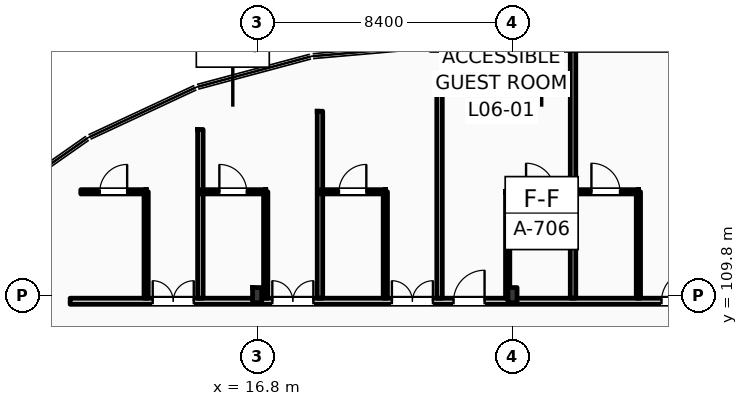
"""IFC4 building model, lengths in metres.
Left out: names, types, materials, properties, quantities, classifications, styles, units other than length and angle.
Written with IfcOpenShell. Run it as: python <this file> out.ifc"""

import sys

from ifc_helpers import new_model, si_unit, direction, frame, frame_2d, origin, origin_2d, place, context, subcontext, project, spatial, rectangle, i_section, extrude, element, fill, save


model = new_model("IFC4")
c1 = context("Model", 3, precision=1e-05, world=origin(), true_north=direction((0.0, 1.0)))
c2 = subcontext(c1, "Body", "Model", "MODEL_VIEW")
j1 = project(units=[si_unit("LENGTHUNIT", "METRE"), si_unit("PLANEANGLEUNIT", "RADIAN")], contexts=[c1])
p1 = place(None, origin())
s1 = spatial("IfcSite", under=j1, at=p1, CompositionType="ELEMENT")
p2 = place(p1, origin())
s2 = spatial("IfcBuilding", under=s1, at=p2, CompositionType="ELEMENT")
p3 = place(p2, frame((0.0, 0.0, 28.2)))
s3 = spatial("IfcBuildingStorey", under=s2, at=p3, CompositionType="ELEMENT", Elevation=28.2)
for number, where, z_axis, x_axis in (
    (1, (16.8, 109.8, 0.0), (0.0, 0.0, 1.0), (1.0, 0.0, 0.0)),
    (2, (25.2, 109.8, 0.0), (0.0, 0.0, 1.0), (1.0, 0.0, 0.0)),
):
    element("IfcColumn", number, at=place(p3, frame(where, z_axis=z_axis, x_axis=x_axis)), inside=s3, PredefinedType="COLUMN", context=c2, shape_type="SweptSolid", body=[
        extrude(i_section(OverallWidth=0.3, OverallDepth=0.5, WebThickness=0.014, FlangeThickness=0.028, FilletRadius=0.027, at=origin_2d()), origin(), (0.0, 0.0, 1.0), 3.6),
    ])
p4 = place(p3, frame((25.2, 118.0, 0.0), z_axis=(0.0, 0.0, 1.0), x_axis=(1.0, 0.0, 0.0)))
e3 = element("IfcColumn", 3, at=p4, inside=s3, PredefinedType="COLUMN", context=c2, shape_type="SweptSolid", body=[
    extrude(i_section(OverallWidth=0.3, OverallDepth=0.45, WebThickness=0.014, FlangeThickness=0.026, FilletRadius=0.027, at=origin_2d()), origin(), (0.0, 0.0, 1.0), 3.6),
])
p5 = place(p3, frame((10.65, 109.6, 0.0), z_axis=(0.0, 0.0, 1.0), x_axis=(1.0, 0.0, 0.0)))
e4 = element("IfcWall", 4, at=p5, inside=s3, PredefinedType="PARTITIONING", context=c2, shape_type="SweptSolid", body=[
    extrude(rectangle(XDim=109.21, YDim=0.2, at=frame_2d((54.605, 0.0))), origin(), (0.0, 0.0, 1.0), 2.8),
])
p6 = place(p5, frame((12.611, 0.0, 0.0)))
e5 = element("IfcOpeningElement", 5, at=p6, cuts=e4, PredefinedType="OPENING", context=c2, shape_type="SweptSolid", body=[
    extrude(rectangle(XDim=1.02, YDim=2.2, at=frame_2d((0.51, 1.1))), frame((0.0, 0.11, 0.0), z_axis=(0.0, -1.0, 0.0), x_axis=(1.0, 0.0, 0.0)), (0.0, 0.0, 1.0), 0.22),
])
p7 = place(p5, frame((19.451, 0.0, 0.0)))
e6 = element("IfcOpeningElement", 6, at=p7, cuts=e4, PredefinedType="OPENING", context=c2, shape_type="SweptSolid", body=[
    extrude(rectangle(XDim=1.02, YDim=2.2, at=frame_2d((0.51, 1.1))), frame((0.0, 0.11, 0.0), z_axis=(0.0, -1.0, 0.0), x_axis=(1.0, 0.0, 0.0)), (0.0, 0.0, 1.0), 0.22),
])
p8 = place(p5, frame((23.842, 0.0, 0.0)))
e7 = element("IfcOpeningElement", 7, at=p8, cuts=e4, PredefinedType="OPENING", context=c2, shape_type="SweptSolid", body=[
    extrude(rectangle(XDim=1.02, YDim=2.2, at=frame_2d((0.51, 1.1))), frame((0.0, 0.11, 0.0), z_axis=(0.0, -1.0, 0.0), x_axis=(1.0, 0.0, 0.0)), (0.0, 0.0, 1.0), 0.22),
])
p9 = place(p5, frame((26.084, 0.0, 0.0)))
e8 = element("IfcOpeningElement", 8, at=p9, cuts=e4, PredefinedType="OPENING", context=c2, shape_type="SweptSolid", body=[
    extrude(rectangle(XDim=1.02, YDim=2.2, at=frame_2d((0.51, 1.1))), frame((0.0, 0.11, 0.0), z_axis=(0.0, -1.0, 0.0), x_axis=(1.0, 0.0, 0.0)), (0.0, 0.0, 1.0), 0.22),
])
p10 = place(p5, frame((32.655, 0.0, 0.0)))
e9 = element("IfcOpeningElement", 9, at=p10, cuts=e4, PredefinedType="OPENING", context=c2, shape_type="SweptSolid", body=[
    extrude(rectangle(XDim=0.96, YDim=2.2, at=frame_2d((0.48, 1.1))), frame((0.0, 0.11, 0.0), z_axis=(0.0, -1.0, 0.0), x_axis=(1.0, 0.0, 0.0)), (0.0, 0.0, 1.0), 0.22),
])
p11 = place(p5, frame((34.895, 0.0, 0.0)))
e10 = element("IfcOpeningElement", 10, at=p11, cuts=e4, PredefinedType="OPENING", context=c2, shape_type="SweptSolid", body=[
    extrude(rectangle(XDim=0.96, YDim=2.2, at=frame_2d((0.48, 1.1))), frame((0.0, 0.11, 0.0), z_axis=(0.0, -1.0, 0.0), x_axis=(1.0, 0.0, 0.0)), (0.0, 0.0, 1.0), 0.22),
])
p12 = place(p5, frame((41.436, 0.0, 0.0)))
e11 = element("IfcOpeningElement", 11, at=p12, cuts=e4, PredefinedType="OPENING", context=c2, shape_type="SweptSolid", body=[
    extrude(rectangle(XDim=0.96, YDim=2.2, at=frame_2d((0.48, 1.1))), frame((0.0, 0.11, 0.0), z_axis=(0.0, -1.0, 0.0), x_axis=(1.0, 0.0, 0.0)), (0.0, 0.0, 1.0), 0.22),
])
p13 = place(p5, frame((43.427, 0.0, 0.0)))
e12 = element("IfcOpeningElement", 12, at=p13, cuts=e4, PredefinedType="OPENING", context=c2, shape_type="SweptSolid", body=[
    extrude(rectangle(XDim=0.96, YDim=2.2, at=frame_2d((0.48, 1.1))), frame((0.0, 0.11, 0.0), z_axis=(0.0, -1.0, 0.0), x_axis=(1.0, 0.0, 0.0)), (0.0, 0.0, 1.0), 0.22),
])
p14 = place(p5, frame((50.218, 0.0, 0.0)))
e13 = element("IfcOpeningElement", 13, at=p14, cuts=e4, PredefinedType="OPENING", context=c2, shape_type="SweptSolid", body=[
    extrude(rectangle(XDim=0.96, YDim=2.2, at=frame_2d((0.48, 1.1))), frame((0.0, 0.11, 0.0), z_axis=(0.0, -1.0, 0.0), x_axis=(1.0, 0.0, 0.0)), (0.0, 0.0, 1.0), 0.22),
])
p15 = place(p5, frame((54.859, 0.0, 0.0)))
e14 = element("IfcOpeningElement", 14, at=p15, cuts=e4, PredefinedType="OPENING", context=c2, shape_type="SweptSolid", body=[
    extrude(rectangle(XDim=0.96, YDim=2.2, at=frame_2d((0.48, 1.1))), frame((0.0, 0.11, 0.0), z_axis=(0.0, -1.0, 0.0), x_axis=(1.0, 0.0, 0.0)), (0.0, 0.0, 1.0), 0.22),
])
p16 = place(p5, frame((59.0, 0.0, 0.0)))
e15 = element("IfcOpeningElement", 15, at=p16, cuts=e4, PredefinedType="OPENING", context=c2, shape_type="SweptSolid", body=[
    extrude(rectangle(XDim=0.96, YDim=2.2, at=frame_2d((0.48, 1.1))), frame((0.0, 0.11, 0.0), z_axis=(0.0, -1.0, 0.0), x_axis=(1.0, 0.0, 0.0)), (0.0, 0.0, 1.0), 0.22),
])
p17 = place(p5, frame((63.39, 0.0, 0.0)))
e16 = element("IfcOpeningElement", 16, at=p17, cuts=e4, PredefinedType="OPENING", context=c2, shape_type="SweptSolid", body=[
    extrude(rectangle(XDim=0.96, YDim=2.2, at=frame_2d((0.48, 1.1))), frame((0.0, 0.11, 0.0), z_axis=(0.0, -1.0, 0.0), x_axis=(1.0, 0.0, 0.0)), (0.0, 0.0, 1.0), 0.22),
])
p18 = place(p5, frame((65.631, 0.0, 0.0)))
e17 = element("IfcOpeningElement", 17, at=p18, cuts=e4, PredefinedType="OPENING", context=c2, shape_type="SweptSolid", body=[
    extrude(rectangle(XDim=0.96, YDim=2.2, at=frame_2d((0.48, 1.1))), frame((0.0, 0.11, 0.0), z_axis=(0.0, -1.0, 0.0), x_axis=(1.0, 0.0, 0.0)), (0.0, 0.0, 1.0), 0.22),
])
p19 = place(p5, frame((72.172, 0.0, 0.0)))
e18 = element("IfcOpeningElement", 18, at=p19, cuts=e4, PredefinedType="OPENING", context=c2, shape_type="SweptSolid", body=[
    extrude(rectangle(XDim=0.96, YDim=2.2, at=frame_2d((0.48, 1.1))), frame((0.0, 0.11, 0.0), z_axis=(0.0, -1.0, 0.0), x_axis=(1.0, 0.0, 0.0)), (0.0, 0.0, 1.0), 0.22),
])
p20 = place(p5, frame((74.413, 0.0, 0.0)))
e19 = element("IfcOpeningElement", 19, at=p20, cuts=e4, PredefinedType="OPENING", context=c2, shape_type="SweptSolid", body=[
    extrude(rectangle(XDim=0.96, YDim=2.2, at=frame_2d((0.48, 1.1))), frame((0.0, 0.11, 0.0), z_axis=(0.0, -1.0, 0.0), x_axis=(1.0, 0.0, 0.0)), (0.0, 0.0, 1.0), 0.22),
])
p21 = place(p5, frame((80.954, 0.0, 0.0)))
e20 = element("IfcOpeningElement", 20, at=p21, cuts=e4, PredefinedType="OPENING", context=c2, shape_type="SweptSolid", body=[
    extrude(rectangle(XDim=0.96, YDim=2.2, at=frame_2d((0.48, 1.1))), frame((0.0, 0.11, 0.0), z_axis=(0.0, -1.0, 0.0), x_axis=(1.0, 0.0, 0.0)), (0.0, 0.0, 1.0), 0.22),
])
p22 = place(p5, frame((83.195, 0.0, 0.0)))
e21 = element("IfcOpeningElement", 21, at=p22, cuts=e4, PredefinedType="OPENING", context=c2, shape_type="SweptSolid", body=[
    extrude(rectangle(XDim=0.96, YDim=2.2, at=frame_2d((0.48, 1.1))), frame((0.0, 0.11, 0.0), z_axis=(0.0, -1.0, 0.0), x_axis=(1.0, 0.0, 0.0)), (0.0, 0.0, 1.0), 0.22),
])
p23 = place(p5, frame((89.735, 0.0, 0.0)))
e22 = element("IfcOpeningElement", 22, at=p23, cuts=e4, PredefinedType="OPENING", context=c2, shape_type="SweptSolid", body=[
    extrude(rectangle(XDim=0.96, YDim=2.2, at=frame_2d((0.48, 1.1))), frame((0.0, 0.11, 0.0), z_axis=(0.0, -1.0, 0.0), x_axis=(1.0, 0.0, 0.0)), (0.0, 0.0, 1.0), 0.22),
])
p24 = place(p5, frame((94.126, 0.0, 0.0)))
e23 = element("IfcOpeningElement", 23, at=p24, cuts=e4, PredefinedType="OPENING", context=c2, shape_type="SweptSolid", body=[
    extrude(rectangle(XDim=0.96, YDim=2.2, at=frame_2d((0.48, 1.1))), frame((0.0, 0.11, 0.0), z_axis=(0.0, -1.0, 0.0), x_axis=(1.0, 0.0, 0.0)), (0.0, 0.0, 1.0), 0.22),
])
p25 = place(p5, frame((98.517, 0.0, 0.0)))
e24 = element("IfcOpeningElement", 24, at=p25, cuts=e4, PredefinedType="OPENING", context=c2, shape_type="SweptSolid", body=[
    extrude(rectangle(XDim=0.96, YDim=2.2, at=frame_2d((0.48, 1.1))), frame((0.0, 0.11, 0.0), z_axis=(0.0, -1.0, 0.0), x_axis=(1.0, 0.0, 0.0)), (0.0, 0.0, 1.0), 0.22),
])
p26 = place(p5, frame((102.908, 0.0, 0.0)))
e25 = element("IfcOpeningElement", 25, at=p26, cuts=e4, PredefinedType="OPENING", context=c2, shape_type="SweptSolid", body=[
    extrude(rectangle(XDim=0.96, YDim=2.2, at=frame_2d((0.48, 1.1))), frame((0.0, 0.11, 0.0), z_axis=(0.0, -1.0, 0.0), x_axis=(1.0, 0.0, 0.0)), (0.0, 0.0, 1.0), 0.22),
])
p27 = place(p5, frame((105.099, 0.0, 0.0)))
e26 = element("IfcOpeningElement", 26, at=p27, cuts=e4, PredefinedType="OPENING", context=c2, shape_type="SweptSolid", body=[
    extrude(rectangle(XDim=0.96, YDim=2.2, at=frame_2d((0.48, 1.1))), frame((0.0, 0.11, 0.0), z_axis=(0.0, -1.0, 0.0), x_axis=(1.0, 0.0, 0.0)), (0.0, 0.0, 1.0), 0.22),
])
p28 = place(p5, frame((2.716, 0.0, 0.0)))
e27 = element("IfcOpeningElement", 27, at=p28, cuts=e4, PredefinedType="OPENING", context=c2, shape_type="SweptSolid", body=[
    extrude(rectangle(XDim=1.35, YDim=2.25, at=frame_2d((0.675, 1.125))), frame((0.0, 0.11, 0.0), z_axis=(0.0, -1.0, 0.0), x_axis=(1.0, 0.0, 0.0)), (0.0, 0.0, 1.0), 0.22),
])
p29 = place(p5, frame((6.65, 0.0, 0.0)))
e28 = element("IfcOpeningElement", 28, at=p29, cuts=e4, PredefinedType="OPENING", context=c2, shape_type="SweptSolid", body=[
    extrude(rectangle(XDim=1.35, YDim=2.25, at=frame_2d((0.675, 1.125))), frame((0.0, 0.11, 0.0), z_axis=(0.0, -1.0, 0.0), x_axis=(1.0, 0.0, 0.0)), (0.0, 0.0, 1.0), 0.22),
])
p30 = place(p5, frame((10.583, 0.0, 0.0)))
e29 = element("IfcOpeningElement", 29, at=p30, cuts=e4, PredefinedType="OPENING", context=c2, shape_type="SweptSolid", body=[
    extrude(rectangle(XDim=1.35, YDim=2.25, at=frame_2d((0.675, 1.125))), frame((0.0, 0.11, 0.0), z_axis=(0.0, -1.0, 0.0), x_axis=(1.0, 0.0, 0.0)), (0.0, 0.0, 1.0), 0.22),
])
p31 = place(p3, frame((27.191, 109.7, 0.0), z_axis=(0.0, 0.0, 1.0), x_axis=(0.0, 1.0, 0.0)))
e30 = element("IfcWall", 30, at=p31, inside=s3, PredefinedType="PARTITIONING", context=c2, shape_type="SweptSolid", body=[
    extrude(rectangle(XDim=8.15, YDim=0.18, at=frame_2d((4.075, 0.0))), origin(), (0.0, 0.0, 1.0), 3.36),
])
p32 = place(p3, frame((25.041, 109.7, 0.0), z_axis=(0.0, 0.0, 1.0), x_axis=(0.0, 1.0, 0.0)))
e31 = element("IfcWall", 31, at=p32, inside=s3, PredefinedType="PARTITIONING", context=c2, shape_type="SweptSolid", body=[
    extrude(rectangle(XDim=3.5, YDim=0.14, at=frame_2d((1.75, 0.0))), origin(), (0.0, 0.0, 1.0), 2.99),
])
p33 = place(p3, frame((25.041, 113.2, 0.0), z_axis=(0.0, 0.0, 1.0), x_axis=(1.0, 0.0, 0.0)))
e32 = element("IfcWall", 32, at=p33, inside=s3, PredefinedType="PARTITIONING", context=c2, shape_type="SweptSolid", body=[
    extrude(rectangle(XDim=2.15, YDim=0.14, at=frame_2d((1.075, 0.0))), origin(), (0.0, 0.0, 1.0), 3.36),
])
p34 = place(p33, frame((0.605, 0.0, 0.0)))
e33 = element("IfcOpeningElement", 33, at=p34, cuts=e32, PredefinedType="OPENING", context=c2, shape_type="SweptSolid", body=[
    extrude(rectangle(XDim=0.94, YDim=2.15, at=frame_2d((0.47, 1.075))), frame((0.0, 0.08, 0.0), z_axis=(0.0, -1.0, 0.0), x_axis=(1.0, 0.0, 0.0)), (0.0, 0.0, 1.0), 0.16),
])
p35 = place(p3, frame((29.341, 109.7, 0.0), z_axis=(0.0, 0.0, 1.0), x_axis=(0.0, 1.0, 0.0)))
e34 = element("IfcWall", 34, at=p35, inside=s3, PredefinedType="PARTITIONING", context=c2, shape_type="SweptSolid", body=[
    extrude(rectangle(XDim=3.5, YDim=0.14, at=frame_2d((1.75, 0.0))), origin(), (0.0, 0.0, 1.0), 3.36),
])
p36 = place(p3, frame((27.191, 113.2, 0.0), z_axis=(0.0, 0.0, 1.0), x_axis=(1.0, 0.0, 0.0)))
e35 = element("IfcWall", 35, at=p36, inside=s3, PredefinedType="PARTITIONING", context=c2, shape_type="SweptSolid", body=[
    extrude(rectangle(XDim=2.15, YDim=0.14, at=frame_2d((1.075, 0.0))), origin(), (0.0, 0.0, 1.0), 3.36),
])
p37 = place(p36, frame((0.605, 0.0, 0.0)))
e36 = element("IfcOpeningElement", 36, at=p37, cuts=e35, PredefinedType="OPENING", context=c2, shape_type="SweptSolid", body=[
    extrude(rectangle(XDim=0.94, YDim=2.15, at=frame_2d((0.47, 1.075))), frame((0.0, 0.08, 0.0), z_axis=(0.0, -1.0, 0.0), x_axis=(1.0, 0.0, 0.0)), (0.0, 0.0, 1.0), 0.16),
])
p38 = place(p3, frame((14.933, 109.7, 0.0), z_axis=(0.0, 0.0, 1.0), x_axis=(0.0, 1.0, 0.0)))
e37 = element("IfcWall", 37, at=p38, inside=s3, PredefinedType="PARTITIONING", context=c2, shape_type="SweptSolid", body=[
    extrude(rectangle(XDim=5.55, YDim=0.18, at=frame_2d((2.775, 0.0))), origin(), (0.0, 0.0, 1.0), 3.36),
])
p39 = place(p3, frame((13.15, 109.7, 0.0), z_axis=(0.0, 0.0, 1.0), x_axis=(0.0, 1.0, 0.0)))
e38 = element("IfcWall", 38, at=p39, inside=s3, PredefinedType="PARTITIONING", context=c2, shape_type="SweptSolid", body=[
    extrude(rectangle(XDim=3.5, YDim=0.14, at=frame_2d((1.75, 0.0))), origin(), (0.0, 0.0, 1.0), 3.36),
])
p40 = place(p3, frame((11.0, 113.2, 0.0), z_axis=(0.0, 0.0, 1.0), x_axis=(1.0, 0.0, 0.0)))
e39 = element("IfcWall", 39, at=p40, inside=s3, PredefinedType="PARTITIONING", context=c2, shape_type="SweptSolid", body=[
    extrude(rectangle(XDim=2.15, YDim=0.14, at=frame_2d((1.075, 0.0))), origin(), (0.0, 0.0, 1.0), 3.36),
])
p41 = place(p40, frame((0.625, 0.0, 0.0)))
e40 = element("IfcOpeningElement", 40, at=p41, cuts=e39, PredefinedType="OPENING", context=c2, shape_type="SweptSolid", body=[
    extrude(rectangle(XDim=0.9, YDim=2.1, at=frame_2d((0.45, 1.05))), frame((0.0, 0.08, 0.0), z_axis=(0.0, -1.0, 0.0), x_axis=(1.0, 0.0, 0.0)), (0.0, 0.0, 1.0), 0.16),
])
p42 = place(p3, frame((18.867, 109.7, 0.0), z_axis=(0.0, 0.0, 1.0), x_axis=(0.0, 1.0, 0.0)))
e41 = element("IfcWall", 41, at=p42, inside=s3, PredefinedType="PARTITIONING", context=c2, shape_type="SweptSolid", body=[
    extrude(rectangle(XDim=6.15, YDim=0.18, at=frame_2d((3.075, 0.0))), origin(), (0.0, 0.0, 1.0), 3.36),
])
p43 = place(p3, frame((17.083, 109.7, 0.0), z_axis=(0.0, 0.0, 1.0), x_axis=(0.0, 1.0, 0.0)))
e42 = element("IfcWall", 42, at=p43, inside=s3, PredefinedType="PARTITIONING", context=c2, shape_type="SweptSolid", body=[
    extrude(rectangle(XDim=3.5, YDim=0.14, at=frame_2d((1.75, 0.0))), origin(), (0.0, 0.0, 1.0), 3.36),
])
p44 = place(p3, frame((14.933, 113.2, 0.0), z_axis=(0.0, 0.0, 1.0), x_axis=(1.0, 0.0, 0.0)))
e43 = element("IfcWall", 43, at=p44, inside=s3, PredefinedType="PARTITIONING", context=c2, shape_type="SweptSolid", body=[
    extrude(rectangle(XDim=2.15, YDim=0.14, at=frame_2d((1.075, 0.0))), origin(), (0.0, 0.0, 1.0), 3.36),
])
p45 = place(p44, frame((0.625, 0.0, 0.0)))
e44 = element("IfcOpeningElement", 44, at=p45, cuts=e43, PredefinedType="OPENING", context=c2, shape_type="SweptSolid", body=[
    extrude(rectangle(XDim=0.9, YDim=2.1, at=frame_2d((0.45, 1.05))), frame((0.0, 0.08, 0.0), z_axis=(0.0, -1.0, 0.0), x_axis=(1.0, 0.0, 0.0)), (0.0, 0.0, 1.0), 0.16),
])
p46 = place(p3, frame((22.8, 109.7, 0.0), z_axis=(0.0, 0.0, 1.0), x_axis=(0.0, 1.0, 0.0)))
e45 = element("IfcWall", 45, at=p46, inside=s3, PredefinedType="PARTITIONING", context=c2, shape_type="SweptSolid", body=[
    extrude(rectangle(XDim=7.2, YDim=0.18, at=frame_2d((3.6, 0.0))), origin(), (0.0, 0.0, 1.0), 3.36),
])
p47 = place(p3, frame((21.017, 109.7, 0.0), z_axis=(0.0, 0.0, 1.0), x_axis=(0.0, 1.0, 0.0)))
e46 = element("IfcWall", 46, at=p47, inside=s3, PredefinedType="PARTITIONING", context=c2, shape_type="SweptSolid", body=[
    extrude(rectangle(XDim=3.5, YDim=0.14, at=frame_2d((1.75, 0.0))), origin(), (0.0, 0.0, 1.0), 3.36),
])
p48 = place(p3, frame((18.867, 113.2, 0.0), z_axis=(0.0, 0.0, 1.0), x_axis=(1.0, 0.0, 0.0)))
e47 = element("IfcWall", 47, at=p48, inside=s3, PredefinedType="PARTITIONING", context=c2, shape_type="SweptSolid", body=[
    extrude(rectangle(XDim=2.15, YDim=0.14, at=frame_2d((1.075, 0.0))), origin(), (0.0, 0.0, 1.0), 3.36),
])
p49 = place(p48, frame((0.625, 0.0, 0.0)))
e48 = element("IfcOpeningElement", 48, at=p49, cuts=e47, PredefinedType="OPENING", context=c2, shape_type="SweptSolid", body=[
    extrude(rectangle(XDim=0.9, YDim=2.1, at=frame_2d((0.45, 1.05))), frame((0.0, 0.08, 0.0), z_axis=(0.0, -1.0, 0.0), x_axis=(1.0, 0.0, 0.0)), (0.0, 0.0, 1.0), 0.16),
])
p50 = place(p6, origin())
e49 = element("IfcDoor", 49, at=p50, inside=s3, OperationType="SINGLE_SWING_RIGHT", PredefinedType="DOOR", context=c2, shape_type="SweptSolid", body=[
    extrude(rectangle(XDim=1.02, YDim=2.2, at=frame_2d((0.51, 1.1))), frame((0.0, 0.025, 0.0), z_axis=(0.0, -1.0, 0.0), x_axis=(1.0, 0.0, 0.0)), (0.0, 0.0, 1.0), 0.05),
])
fill(e5, e49)
p51 = place(p34, origin())
e50 = element("IfcDoor", 50, at=p51, inside=s3, OperationType="SINGLE_SWING_LEFT", PredefinedType="DOOR", context=c2, shape_type="SweptSolid", body=[
    extrude(rectangle(XDim=0.94, YDim=2.15, at=frame_2d((0.47, 1.075))), frame((0.0, 0.025, 0.0), z_axis=(0.0, -1.0, 0.0), x_axis=(1.0, 0.0, 0.0)), (0.0, 0.0, 1.0), 0.05),
])
fill(e33, e50)
p52 = place(p7, origin())
e51 = element("IfcDoor", 51, at=p52, inside=s3, OperationType="SINGLE_SWING_RIGHT", PredefinedType="DOOR", context=c2, shape_type="SweptSolid", body=[
    extrude(rectangle(XDim=1.02, YDim=2.2, at=frame_2d((0.51, 1.1))), frame((0.0, 0.025, 0.0), z_axis=(0.0, -1.0, 0.0), x_axis=(1.0, 0.0, 0.0)), (0.0, 0.0, 1.0), 0.05),
])
fill(e6, e51)
p53 = place(p37, origin())
e52 = element("IfcDoor", 52, at=p53, inside=s3, OperationType="SINGLE_SWING_LEFT", PredefinedType="DOOR", context=c2, shape_type="SweptSolid", body=[
    extrude(rectangle(XDim=0.94, YDim=2.15, at=frame_2d((0.47, 1.075))), frame((0.0, 0.025, 0.0), z_axis=(0.0, -1.0, 0.0), x_axis=(1.0, 0.0, 0.0)), (0.0, 0.0, 1.0), 0.05),
])
fill(e36, e52)
p54 = place(p28, origin())
e53 = element("IfcDoor", 53, at=p54, inside=s3, OperationType="DOUBLE_SWING_LEFT", PredefinedType="DOOR", context=c2, shape_type="SweptSolid", body=[
    extrude(rectangle(XDim=1.35, YDim=2.25, at=frame_2d((0.675, 1.125))), frame((0.0, 0.025, 0.0), z_axis=(0.0, -1.0, 0.0), x_axis=(1.0, 0.0, 0.0)), (0.0, 0.0, 1.0), 0.05),
])
fill(e27, e53)
p55 = place(p41, origin())
e54 = element("IfcDoor", 54, at=p55, inside=s3, OperationType="SINGLE_SWING_RIGHT", PredefinedType="DOOR", context=c2, shape_type="SweptSolid", body=[
    extrude(rectangle(XDim=0.9, YDim=2.1, at=frame_2d((0.45, 1.05))), frame((0.0, 0.025, 0.0), z_axis=(0.0, -1.0, 0.0), x_axis=(1.0, 0.0, 0.0)), (0.0, 0.0, 1.0), 0.05),
])
fill(e40, e54)
p56 = place(p29, origin())
e55 = element("IfcDoor", 55, at=p56, inside=s3, OperationType="DOUBLE_SWING_LEFT", PredefinedType="DOOR", context=c2, shape_type="SweptSolid", body=[
    extrude(rectangle(XDim=1.35, YDim=2.25, at=frame_2d((0.675, 1.125))), frame((0.0, 0.025, 0.0), z_axis=(0.0, -1.0, 0.0), x_axis=(1.0, 0.0, 0.0)), (0.0, 0.0, 1.0), 0.05),
])
fill(e28, e55)
p57 = place(p45, origin())
e56 = element("IfcDoor", 56, at=p57, inside=s3, OperationType="SINGLE_SWING_LEFT", PredefinedType="DOOR", context=c2, shape_type="SweptSolid", body=[
    extrude(rectangle(XDim=0.9, YDim=2.1, at=frame_2d((0.45, 1.05))), frame((0.0, 0.025, 0.0), z_axis=(0.0, -1.0, 0.0), x_axis=(1.0, 0.0, 0.0)), (0.0, 0.0, 1.0), 0.05),
])
fill(e44, e56)
p58 = place(p30, origin())
e57 = element("IfcDoor", 57, at=p58, inside=s3, OperationType="DOUBLE_SWING_LEFT", PredefinedType="DOOR", context=c2, shape_type="SweptSolid", body=[
    extrude(rectangle(XDim=1.35, YDim=2.25, at=frame_2d((0.675, 1.125))), frame((0.0, 0.025, 0.0), z_axis=(0.0, -1.0, 0.0), x_axis=(1.0, 0.0, 0.0)), (0.0, 0.0, 1.0), 0.05),
])
fill(e29, e57)
p59 = place(p49, origin())
e58 = element("IfcDoor", 58, at=p59, inside=s3, OperationType="SINGLE_SWING_RIGHT", PredefinedType="DOOR", context=c2, shape_type="SweptSolid", body=[
    extrude(rectangle(XDim=0.9, YDim=2.1, at=frame_2d((0.45, 1.05))), frame((0.0, 0.025, 0.0), z_axis=(0.0, -1.0, 0.0), x_axis=(1.0, 0.0, 0.0)), (0.0, 0.0, 1.0), 0.05),
])
fill(e48, e58)
save(model, sys.argv[1])
